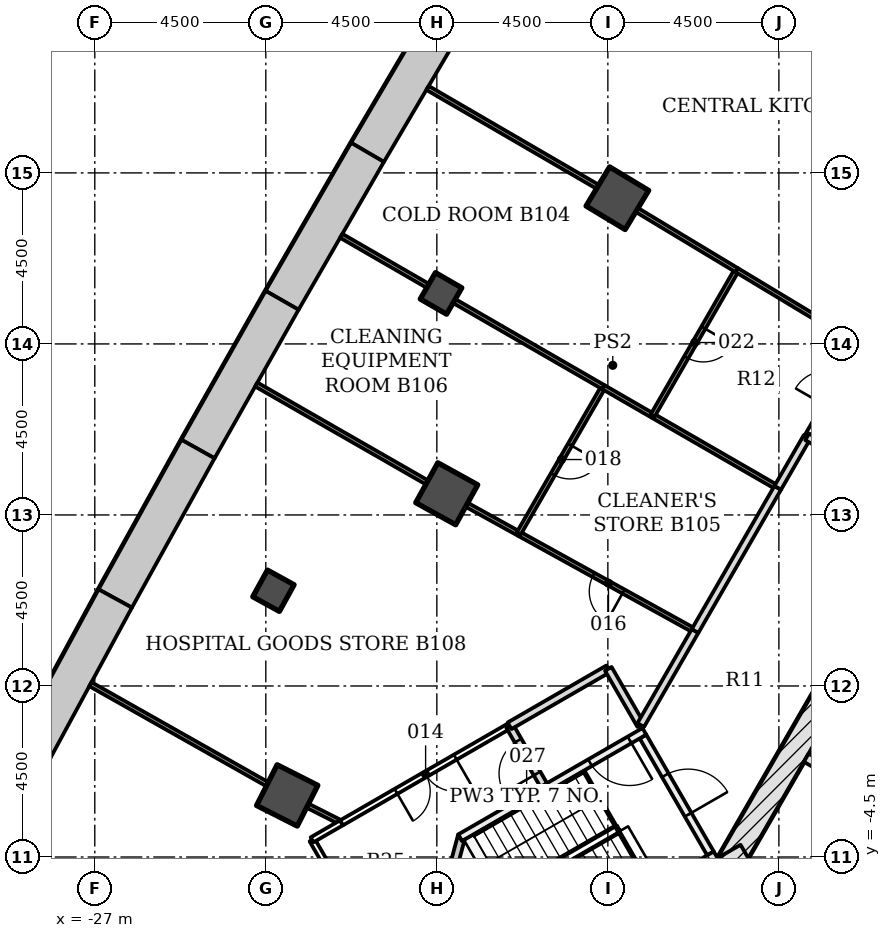
"""IFC4 building model, lengths in metres.
Left out: names, types, materials, properties, quantities, classifications, styles, units other than length and angle.
Written with IfcOpenShell. Run it as: python <this file> out.ifc"""

import sys

from ifc_helpers import new_model, si_unit, direction, frame, frame_2d, origin, origin_2d, place, context, subcontext, project, spatial, polyline, rectangle, outline, extrude, element, fill, save


model = new_model("IFC4")
c1 = context("Model", 3, precision=1e-05, world=origin(), true_north=direction((0.0, 1.0)))
c2 = subcontext(c1, "Body", "Model", "MODEL_VIEW")
j1 = project(units=[si_unit("LENGTHUNIT", "METRE"), si_unit("PLANEANGLEUNIT", "RADIAN")], contexts=[c1])
p1 = place(None, origin())
s1 = spatial("IfcSite", under=j1, at=p1, CompositionType="ELEMENT")
p2 = place(p1, origin())
s2 = spatial("IfcBuilding", under=s1, at=p2, CompositionType="ELEMENT")
p3 = place(p2, frame((0.0, 0.0, -4.5)))
s3 = spatial("IfcBuildingStorey", under=s2, at=p3, CompositionType="ELEMENT", Elevation=-4.5)
p4 = place(p3, origin())
e1 = element("IfcWall", 1, at=p4, inside=s3, PredefinedType="SOLIDWALL", context=c2, shape_type="SweptSolid", body=[
    extrude(outline(polyline([(-17.971, 18.17), (-20.256, 14.293), (-19.393, 13.789), (-17.112, 17.658), (-17.971, 18.17)])), origin(), (0.0, 0.0, 1.0), 4.25),
])
p5 = place(p3, origin())
e2 = element("IfcWall", 2, at=p5, inside=s3, PredefinedType="SOLIDWALL", context=c2, shape_type="SweptSolid", body=[
    extrude(outline(polyline([(-20.256, 14.293), (-22.506, 10.396), (-21.638, 9.9), (-19.393, 13.789), (-20.256, 14.293)])), origin(), (0.0, 0.0, 1.0), 4.25),
])
p6 = place(p3, origin())
e3 = element("IfcWall", 3, at=p6, inside=s3, PredefinedType="SOLIDWALL", context=c2, shape_type="SweptSolid", body=[
    extrude(outline(polyline([(-22.506, 10.396), (-24.721, 6.479), (-23.848, 5.99), (-21.638, 9.9), (-22.506, 10.396)])), origin(), (0.0, 0.0, 1.0), 4.25),
])
p7 = place(p3, origin())
e4 = element("IfcWall", 4, at=p7, inside=s3, PredefinedType="SOLIDWALL", context=c2, shape_type="SweptSolid", body=[
    extrude(outline(polyline([(-24.721, 6.479), (-26.901, 2.542), (-26.024, 2.062), (-23.848, 5.99), (-24.721, 6.479)])), origin(), (0.0, 0.0, 1.0), 4.25),
])
p8 = place(p3, origin())
e5 = element("IfcWall", 5, at=p8, inside=s3, PredefinedType="SOLIDWALL", context=c2, shape_type="SweptSolid", body=[
    extrude(outline(polyline([(-26.901, 2.542), (-29.045, -1.415), (-28.164, -1.887), (-26.024, 2.062), (-26.901, 2.542)])), origin(), (0.0, 0.0, 1.0), 4.25),
])
for number, where, z_axis, x_axis in (
    (6, (-13.25, 12.834, -0.3), (0.0, 0.0, 1.0), (-0.857, 0.516, 0.0)),
    (7, (-17.739, 5.058, -0.3), (0.0, 0.0, 1.0), (-0.875, 0.484, 0.0)),
    (8, (-21.937, -2.88, -0.3), (0.0, 0.0, 1.0), (-0.893, 0.451, 0.0)),
):
    element("IfcColumn", number, at=place(p3, frame(where, z_axis=z_axis, x_axis=x_axis)), inside=s3, PredefinedType="COLUMN", context=c2, shape_type="SweptSolid", body=[
        extrude(rectangle(XDim=1.2, YDim=1.2, at=origin_2d()), origin(), (0.0, 0.0, 1.0), 4.55),
    ])
for number, where, z_axis, x_axis in (
    (9, (-17.89, 10.329, -0.3), (0.0, 0.0, 1.0), (-0.866, 0.5, 0.0)),
    (10, (-22.3, 2.506, -0.3), (0.0, 0.0, 1.0), (-0.876, 0.482, 0.0)),
):
    element("IfcColumn", number, at=place(p3, frame(where, z_axis=z_axis, x_axis=x_axis)), inside=s3, PredefinedType="COLUMN", context=c2, shape_type="SweptSolid", body=[
        extrude(rectangle(XDim=0.8, YDim=0.8, at=origin_2d()), origin(), (0.0, 0.0, 1.0), 4.55),
    ])
p9 = place(p3, frame((-1.083, 11.281, -0.3), z_axis=(0.0, 0.0, 1.0), x_axis=(-0.500001446645, -0.866024568562, 0.0)))
e11 = element("IfcWall", 11, at=p9, inside=s3, PredefinedType="SHEAR", context=c2, shape_type="SweptSolid", body=[
    extrude(rectangle(XDim=18.458, YDim=0.7, at=frame_2d((9.229, 0.0))), origin(), (0.0, 0.0, 1.0), 4.55),
])
p10 = place(p9, frame((8.979, 0.0, 0.3)))
e12 = element("IfcOpeningElement", 12, at=p10, cuts=e11, PredefinedType="OPENING", context=c2, shape_type="SweptSolid", body=[
    extrude(rectangle(XDim=1.2, YDim=2.1, at=frame_2d((0.6, 1.05))), frame((0.0, 0.36, 0.0), z_axis=(0.0, -1.0, 0.0), x_axis=(1.0, 0.0, 0.0)), (0.0, 0.0, 1.0), 0.72),
])
p11 = place(p9, frame((11.029, 0.0, 0.3)))
e13 = element("IfcOpeningElement", 13, at=p11, cuts=e11, PredefinedType="OPENING", context=c2, shape_type="SweptSolid", body=[
    extrude(rectangle(XDim=1.2, YDim=2.1, at=frame_2d((0.6, 1.05))), frame((0.0, 0.36, 0.0), z_axis=(0.0, -1.0, 0.0), x_axis=(1.0, 0.0, 0.0)), (0.0, 0.0, 1.0), 0.72),
])
p12 = place(p3, frame((-10.311, -4.353, -0.3), z_axis=(0.0, 0.0, 1.0), x_axis=(0.500042739161, -0.866000726912, 0.0)))
e14 = element("IfcWall", 14, at=p12, inside=s3, PredefinedType="SHEAR", context=c2, shape_type="SweptSolid", body=[
    extrude(rectangle(XDim=2.771, YDim=0.7, at=frame_2d((1.386, 0.0))), origin(), (0.0, 0.0, 1.0), 4.55),
])
p13 = place(p3, frame((-8.281, -1.887, 0.0), z_axis=(0.0, 0.0, 1.0), x_axis=(0.866032775405, -0.499987231761, 0.0)))
e15 = element("IfcWall", 15, at=p13, inside=s3, PredefinedType="PARTITIONING", context=c2, shape_type="SweptSolid", body=[
    extrude(rectangle(XDim=2.9, YDim=0.25, at=frame_2d((1.45, 0.0))), origin(), (0.0, 0.0, 1.0), 4.25),
])
p14 = place(p3, frame((-12.576, -1.331, -0.3), z_axis=(0.0, 0.0, 1.0), x_axis=(0.499970499736, -0.8660424351, 0.0)))
e16 = element("IfcWall", 16, at=p14, inside=s3, PredefinedType="SHEAR", context=c2, shape_type="SweptSolid", body=[
    extrude(rectangle(XDim=3.55, YDim=0.2, at=frame_2d((1.775, 0.0))), origin(), (0.0, 0.0, 1.0), 4.55),
])
p15 = place(p14, frame((1.175, 0.0, 0.3)))
e17 = element("IfcOpeningElement", 17, at=p15, cuts=e16, PredefinedType="OPENING", context=c2, shape_type="SweptSolid", body=[
    extrude(rectangle(XDim=1.2, YDim=2.1, at=frame_2d((0.6, 1.05))), frame((0.0, 0.11, 0.0), z_axis=(0.0, -1.0, 0.0), x_axis=(1.0, 0.0, 0.0)), (0.0, 0.0, 1.0), 0.22),
])
p16 = place(p3, frame((-12.539, -1.194, -0.3), z_axis=(0.0, 0.0, 1.0), x_axis=(-0.866045472092, -0.499965239061, 0.0)))
e18 = element("IfcWall", 18, at=p16, inside=s3, PredefinedType="SHEAR", context=c2, shape_type="SweptSolid", body=[
    extrude(rectangle(XDim=5.6, YDim=0.2, at=frame_2d((2.8, 0.0))), origin(), (0.0, 0.0, 1.0), 4.55),
])
p17 = place(p16, frame((0.45, 0.0, 0.3)))
e19 = element("IfcOpeningElement", 19, at=p17, cuts=e18, PredefinedType="OPENING", context=c2, shape_type="SweptSolid", body=[
    extrude(rectangle(XDim=1.2, YDim=2.1, at=frame_2d((0.6, 1.05))), frame((0.0, 0.11, 0.0), z_axis=(0.0, -1.0, 0.0), x_axis=(1.0, 0.0, 0.0)), (0.0, 0.0, 1.0), 0.22),
])
p18 = place(p3, frame((-10.43, -4.847, -0.3), z_axis=(0.0, 0.0, 1.0), x_axis=(-0.866018442252, -0.500012057535, 0.0)))
e20 = element("IfcWall", 20, at=p18, inside=s3, PredefinedType="SHEAR", context=c2, shape_type="SweptSolid", body=[
    extrude(rectangle(XDim=7.2, YDim=1.136, at=frame_2d((3.6, 0.0))), origin(), (0.0, 0.0, 1.0), 4.55),
])
p19 = place(p3, frame((0.0, 0.0, -0.3)))
e21 = element("IfcWall", 21, at=p19, inside=s3, PredefinedType="SHEAR", context=c2, shape_type="SweptSolid", body=[
    extrude(outline(polyline([(-17.439, -3.907), (-18.025, -6.093), (-16.95, -7.955), (-16.777, -7.855), (-17.81, -6.065), (-17.267, -4.039), (-17.339, -4.081), (-17.339, -4.081), (-17.339, -4.081), (-17.339, -4.081), (-17.339, -4.081), (-17.339, -4.081), (-17.339, -4.081), (-17.339, -4.081), (-17.339, -4.081), (-17.339, -4.081), (-17.339, -4.081), (-17.339, -4.081), (-17.339, -4.081), (-17.339, -4.081), (-17.339, -4.081), (-17.339, -4.081), (-17.339, -4.081), (-17.439, -3.907)])), origin(), (0.0, 0.0, 1.0), 4.55),
])
p20 = place(p3, frame((-17.941, -9.838, 0.0), z_axis=(0.0, 0.0, 1.0), x_axis=(-0.500048140185, 0.865997608252, 0.0)))
e22 = element("IfcWall", 22, at=p20, inside=s3, PredefinedType="PARTITIONING", context=c2, shape_type="SweptSolid", body=[
    extrude(rectangle(XDim=6.683, YDim=0.15, at=frame_2d((3.342, 0.0))), origin(), (0.0, 0.0, 1.0), 3.638),
])
p21 = place(p20, frame((2.45, 0.0, 0.0)))
e23 = element("IfcOpeningElement", 23, at=p21, cuts=e22, PredefinedType="OPENING", context=c2, shape_type="SweptSolid", body=[
    extrude(rectangle(XDim=1.8, YDim=2.1, at=frame_2d((0.9, 1.05))), frame((0.0, 0.085, 0.0), z_axis=(0.0, -1.0, 0.0), x_axis=(1.0, 0.0, 0.0)), (0.0, 0.0, 1.0), 0.17),
])
p22 = place(p3, frame((-21.283, -4.048, 0.0), z_axis=(0.0, 0.0, 1.0), x_axis=(0.865804825377, 0.500381858538, 0.0)))
e24 = element("IfcWall", 24, at=p22, inside=s3, PredefinedType="PARTITIONING", context=c2, shape_type="SweptSolid", body=[
    extrude(rectangle(XDim=0.897, YDim=0.15, at=frame_2d((0.449, 0.0))), origin(), (0.0, 0.0, 1.0), 3.638),
])
p23 = place(p3, frame((-22.461, -2.584, 0.0), z_axis=(0.0, 0.0, 1.0), x_axis=(-0.87056283872, 0.492057256668, 0.0)))
e25 = element("IfcWall", 25, at=p23, inside=s3, PredefinedType="PARTITIONING", context=c2, shape_type="SweptSolid", body=[
    extrude(rectangle(XDim=5.347, YDim=0.12, at=frame_2d((2.674, 0.0))), origin(), (0.0, 0.0, 1.0), 3.633),
])
p24 = place(p3, frame((-20.509, -3.601, 0.0), z_axis=(0.0, 0.0, 1.0), x_axis=(-0.892316605155, 0.451410097544, 0.0)))
e26 = element("IfcWall", 26, at=p24, inside=s3, PredefinedType="PARTITIONING", context=c2, shape_type="SweptSolid", body=[
    extrude(rectangle(XDim=1.0, YDim=0.12, at=frame_2d((0.5, 0.0))), origin(), (0.0, 0.0, 1.0), 3.638),
])
p25 = place(p3, frame((-16.087, -1.049, 0.0), z_axis=(0.0, 0.0, 1.0), x_axis=(-0.866071706002, -0.49991979363, 0.0)))
e27 = element("IfcWall", 27, at=p25, inside=s3, PredefinedType="PARTITIONING", context=c2, shape_type="SweptSolid", body=[
    extrude(rectangle(XDim=5.105, YDim=0.15, at=frame_2d((2.552, 0.0))), origin(), (0.0, 0.0, 1.0), 3.638),
])
p26 = place(p25, frame((1.65, 0.0, 0.0)))
e28 = element("IfcOpeningElement", 28, at=p26, cuts=e27, PredefinedType="OPENING", context=c2, shape_type="SweptSolid", body=[
    extrude(rectangle(XDim=1.8, YDim=2.1, at=frame_2d((0.9, 1.05))), frame((0.0, 0.085, 0.0), z_axis=(0.0, -1.0, 0.0), x_axis=(1.0, 0.0, 0.0)), (0.0, 0.0, 1.0), 0.17),
])
p27 = place(p3, frame((-15.188, -2.607, 0.0), z_axis=(0.0, 0.0, 1.0), x_axis=(-0.500024172624, 0.866011447264, 0.0)))
e29 = element("IfcWall", 29, at=p27, inside=s3, PredefinedType="PARTITIONING", context=c2, shape_type="SweptSolid", body=[
    extrude(rectangle(XDim=1.798, YDim=0.2, at=frame_2d((0.899, 0.0))), origin(), (0.0, 0.0, 1.0), 3.638),
])
p28 = place(p27, frame((0.35, 0.0, 0.0)))
e30 = element("IfcOpeningElement", 30, at=p28, cuts=e29, PredefinedType="OPENING", context=c2, shape_type="SweptSolid", body=[
    extrude(rectangle(XDim=1.0, YDim=2.1, at=frame_2d((0.5, 1.05))), frame((0.0, 0.11, 0.0), z_axis=(0.0, -1.0, 0.0), x_axis=(1.0, 0.0, 0.0)), (0.0, 0.0, 1.0), 0.22),
])
p29 = place(p3, frame((-16.087, -1.048, 0.0), z_axis=(0.0, 0.0, 1.0), x_axis=(0.865988915629, 0.500063194015, 0.0)))
e31 = element("IfcWall", 31, at=p29, inside=s3, PredefinedType="PARTITIONING", context=c2, shape_type="SweptSolid", body=[
    extrude(rectangle(XDim=2.998, YDim=0.2, at=frame_2d((1.499, 0.0))), origin(), (0.0, 0.0, 1.0), 3.638),
])
p30 = place(p3, frame((-13.489, 0.451, 0.0), z_axis=(0.0, 0.0, 1.0), x_axis=(0.500044178772, -0.865999895656, 0.0)))
e32 = element("IfcWall", 32, at=p30, inside=s3, PredefinedType="PARTITIONING", context=c2, shape_type="SweptSolid", body=[
    extrude(rectangle(XDim=1.708, YDim=0.2, at=frame_2d((0.854, 0.0))), origin(), (0.0, 0.0, 1.0), 4.25),
])
p31 = place(p3, frame((-12.635, -1.028, 0.0), z_axis=(0.0, 0.0, 1.0), x_axis=(0.50005725472, 0.865992345233, 0.0)))
e33 = element("IfcWall", 33, at=p31, inside=s3, PredefinedType="PARTITIONING", context=c2, shape_type="SweptSolid", body=[
    extrude(rectangle(XDim=2.862, YDim=0.2, at=frame_2d((1.431, 0.0))), origin(), (0.0, 0.0, 1.0), 3.638),
])
p32 = place(p3, frame((-11.208, 1.446, 0.0), z_axis=(0.0, 0.0, 1.0), x_axis=(-0.875127041283, 0.483893233694, 0.0)))
e34 = element("IfcWall", 34, at=p32, inside=s3, PredefinedType="PARTITIONING", context=c2, shape_type="SweptSolid", body=[
    extrude(rectangle(XDim=5.299, YDim=0.12, at=frame_2d((2.649, 0.0))), origin(), (0.0, 0.0, 1.0), 3.638),
])
p33 = place(p32, frame((2.15, 0.0, 0.0)))
e35 = element("IfcOpeningElement", 35, at=p33, cuts=e34, PredefinedType="OPENING", context=c2, shape_type="SweptSolid", body=[
    extrude(rectangle(XDim=0.9, YDim=2.1, at=frame_2d((0.45, 1.05))), frame((0.0, 0.07, 0.0), z_axis=(0.0, -1.0, 0.0), x_axis=(1.0, 0.0, 0.0)), (0.0, 0.0, 1.0), 0.14),
])
p34 = place(p3, frame((-18.26, 5.356, 0.0), z_axis=(0.0, 0.0, 1.0), x_axis=(-0.867438170848, 0.497544992695, 0.0)))
e36 = element("IfcWall", 36, at=p34, inside=s3, PredefinedType="PARTITIONING", context=c2, shape_type="SweptSolid", body=[
    extrude(rectangle(XDim=5.177, YDim=0.12, at=frame_2d((2.589, 0.0))), origin(), (0.0, 0.0, 1.0), 3.633),
])
p35 = place(p3, frame((-15.848, 4.012, 0.0), z_axis=(0.0, 0.0, 1.0), x_axis=(-0.87521017078, 0.483742862442, 0.0)))
e37 = element("IfcWall", 37, at=p35, inside=s3, PredefinedType="PARTITIONING", context=c2, shape_type="SweptSolid", body=[
    extrude(rectangle(XDim=1.561, YDim=0.12, at=frame_2d((0.781, 0.0))), origin(), (0.0, 0.0, 1.0), 3.638),
])
p36 = place(p3, frame((-9.031, 5.213, 0.0), z_axis=(0.0, 0.0, 1.0), x_axis=(-0.500044734646, -0.865999574684, 0.0)))
e38 = element("IfcWall", 38, at=p36, inside=s3, PredefinedType="PARTITIONING", context=c2, shape_type="SweptSolid", body=[
    extrude(rectangle(XDim=4.35, YDim=0.2, at=frame_2d((2.175, 0.0))), origin(), (0.0, 0.0, 1.0), 3.638),
])
p37 = place(p3, frame((-8.256, 6.555, 0.0), z_axis=(0.0, 0.0, 1.0), x_axis=(-0.500177701192, -0.865922783642, 0.0)))
e39 = element("IfcWall", 39, at=p37, inside=s3, PredefinedType="PARTITIONING", context=c2, shape_type="SweptSolid", body=[
    extrude(rectangle(XDim=1.547, YDim=0.2, at=frame_2d((0.774, 0.0))), origin(), (0.0, 0.0, 1.0), 3.638),
])
p38 = place(p3, frame((-5.226, 4.806, 0.0), z_axis=(0.0, 0.0, 1.0), x_axis=(-0.865949687125, 0.500131122175, 0.0)))
e40 = element("IfcWall", 40, at=p38, inside=s3, PredefinedType="PARTITIONING", context=c2, shape_type="SweptSolid", body=[
    extrude(rectangle(XDim=3.499, YDim=0.2, at=frame_2d((1.75, 0.0))), origin(), (0.0, 0.0, 1.0), 4.25),
])
p39 = place(p38, frame((0.95, 0.0, 0.0)))
e41 = element("IfcOpeningElement", 41, at=p39, cuts=e40, PredefinedType="OPENING", context=c2, shape_type="SweptSolid", body=[
    extrude(rectangle(XDim=1.5, YDim=2.1, at=frame_2d((0.75, 1.05))), frame((0.0, 0.11, 0.0), z_axis=(0.0, -1.0, 0.0), x_axis=(1.0, 0.0, 0.0)), (0.0, 0.0, 1.0), 0.22),
])
p40 = place(p3, frame((-13.621, 7.863, 0.0), z_axis=(0.0, 0.0, 1.0), x_axis=(-0.500241930066, -0.865885680332, 0.0)))
e42 = element("IfcWall", 42, at=p40, inside=s3, PredefinedType="PARTITIONING", context=c2, shape_type="SweptSolid", body=[
    extrude(rectangle(XDim=4.448, YDim=0.12, at=frame_2d((2.224, 0.0))), origin(), (0.0, 0.0, 1.0), 3.638),
])
p41 = place(p40, frame((1.75, 0.0, 0.0)))
e43 = element("IfcOpeningElement", 43, at=p41, cuts=e42, PredefinedType="OPENING", context=c2, shape_type="SweptSolid", body=[
    extrude(rectangle(XDim=0.9, YDim=2.1, at=frame_2d((0.45, 1.05))), frame((0.0, 0.07, 0.0), z_axis=(0.0, -1.0, 0.0), x_axis=(1.0, 0.0, 0.0)), (0.0, 0.0, 1.0), 0.14),
])
p42 = place(p3, frame((-9.032, 5.215, 0.0), z_axis=(0.0, 0.0, 1.0), x_axis=(-0.866138487245, 0.49980408253, 0.0)))
e44 = element("IfcWall", 44, at=p42, inside=s3, PredefinedType="PARTITIONING", context=c2, shape_type="SweptSolid", body=[
    extrude(rectangle(XDim=3.797, YDim=0.12, at=frame_2d((1.899, 0.0))), origin(), (0.0, 0.0, 1.0), 3.638),
])
p43 = place(p3, frame((-12.324, 7.115, 0.0), z_axis=(0.0, 0.0, 1.0), x_axis=(-0.865912029007, 0.500196319479, 0.0)))
e45 = element("IfcWall", 45, at=p43, inside=s3, PredefinedType="PARTITIONING", context=c2, shape_type="SweptSolid", body=[
    extrude(rectangle(XDim=1.501, YDim=0.12, at=frame_2d((0.751, 0.0))), origin(), (0.0, 0.0, 1.0), 3.638),
])
p44 = place(p3, frame((-18.237, 10.528, 0.0), z_axis=(0.0, 0.0, 1.0), x_axis=(-0.865891873066, 0.5002312107, 0.0)))
e46 = element("IfcWall", 46, at=p44, inside=s3, PredefinedType="PARTITIONING", context=c2, shape_type="SweptSolid", body=[
    extrude(rectangle(XDim=2.631, YDim=0.12, at=frame_2d((1.315, 0.0))), origin(), (0.0, 0.0, 1.0), 4.25),
])
p45 = place(p3, frame((-13.617, 7.862, 0.0), z_axis=(0.0, 0.0, 1.0), x_axis=(-0.866103979259, 0.499863878583, 0.0)))
e47 = element("IfcWall", 47, at=p45, inside=s3, PredefinedType="PARTITIONING", context=c2, shape_type="SweptSolid", body=[
    extrude(rectangle(XDim=4.533, YDim=0.12, at=frame_2d((2.267, 0.0))), origin(), (0.0, 0.0, 1.0), 3.638),
])
p46 = place(p3, frame((-10.112, 10.942, 0.0), z_axis=(0.0, 0.0, 1.0), x_axis=(-0.500084296963, -0.86597672944, 0.0)))
e48 = element("IfcWall", 48, at=p46, inside=s3, PredefinedType="PARTITIONING", context=c2, shape_type="SweptSolid", body=[
    extrude(rectangle(XDim=4.419, YDim=0.12, at=frame_2d((2.209, 0.0))), origin(), (0.0, 0.0, 1.0), 3.638),
])
p47 = place(p46, frame((1.75, 0.0, 0.0)))
e49 = element("IfcOpeningElement", 49, at=p47, cuts=e48, PredefinedType="OPENING", context=c2, shape_type="SweptSolid", body=[
    extrude(rectangle(XDim=0.9, YDim=2.1, at=frame_2d((0.45, 1.05))), frame((0.0, 0.07, 0.0), z_axis=(0.0, -1.0, 0.0), x_axis=(1.0, 0.0, 0.0)), (0.0, 0.0, 1.0), 0.14),
])
p48 = place(p3, frame((-8.256, 6.558, 0.0), z_axis=(0.0, 0.0, 1.0), x_axis=(0.500081734942, 0.86597820895, 0.0)))
e50 = element("IfcWall", 50, at=p48, inside=s3, PredefinedType="PARTITIONING", context=c2, shape_type="SweptSolid", body=[
    extrude(rectangle(XDim=2.804, YDim=0.15, at=frame_2d((1.402, 0.0))), origin(), (0.0, 0.0, 1.0), 3.638),
])
p49 = place(p48, frame((0.95, 0.0, 0.0)))
e51 = element("IfcOpeningElement", 51, at=p49, cuts=e50, PredefinedType="OPENING", context=c2, shape_type="SweptSolid", body=[
    extrude(rectangle(XDim=0.9, YDim=2.1, at=frame_2d((0.45, 1.05))), frame((0.0, 0.085, 0.0), z_axis=(0.0, -1.0, 0.0), x_axis=(1.0, 0.0, 0.0)), (0.0, 0.0, 1.0), 0.17),
])
p50 = place(p3, frame((-6.857, 8.983, 0.0), z_axis=(0.0, 0.0, 1.0), x_axis=(-0.856573791655, 0.516024553147, 0.0)))
e52 = element("IfcWall", 52, at=p50, inside=s3, PredefinedType="PARTITIONING", context=c2, shape_type="SweptSolid", body=[
    extrude(rectangle(XDim=3.802, YDim=0.12, at=frame_2d((1.901, 0.0))), origin(), (0.0, 0.0, 1.0), 3.638),
])
p51 = place(p3, frame((-13.769, 13.135, 0.0), z_axis=(0.0, 0.0, 1.0), x_axis=(-0.864615819332, 0.502433562734, 0.0)))
e53 = element("IfcWall", 53, at=p51, inside=s3, PredefinedType="PARTITIONING", context=c2, shape_type="SweptSolid", body=[
    extrude(rectangle(XDim=5.177, YDim=0.12, at=frame_2d((2.588, 0.0))), origin(), (0.0, 0.0, 1.0), 3.633),
])
p52 = place(p3, frame((-10.108, 10.941, 0.0), z_axis=(0.0, 0.0, 1.0), x_axis=(-0.856614023764, 0.515957764058, 0.0)))
e54 = element("IfcWall", 54, at=p52, inside=s3, PredefinedType="PARTITIONING", context=c2, shape_type="SweptSolid", body=[
    extrude(rectangle(XDim=3.068, YDim=0.12, at=frame_2d((1.534, 0.0))), origin(), (0.0, 0.0, 1.0), 3.638),
])
p53 = place(p15, origin())
e55 = element("IfcDoor", 55, at=p53, inside=s3, OperationType="SINGLE_SWING_RIGHT", PredefinedType="DOOR", context=c2, shape_type="SweptSolid", body=[
    extrude(rectangle(XDim=1.2, YDim=2.1, at=frame_2d((0.6, 1.05))), frame((0.0, 0.025, 0.0), z_axis=(0.0, -1.0, 0.0), x_axis=(1.0, 0.0, 0.0)), (0.0, 0.0, 1.0), 0.05),
])
fill(e17, e55)
p54 = place(p17, origin())
e56 = element("IfcDoor", 56, at=p54, inside=s3, OperationType="SINGLE_SWING_LEFT", PredefinedType="DOOR", context=c2, shape_type="SweptSolid", body=[
    extrude(rectangle(XDim=1.2, YDim=2.1, at=frame_2d((0.6, 1.05))), frame((0.0, 0.025, 0.0), z_axis=(0.0, -1.0, 0.0), x_axis=(1.0, 0.0, 0.0)), (0.0, 0.0, 1.0), 0.05),
])
fill(e19, e56)
p55 = place(p26, origin())
e57 = element("IfcDoor", 57, at=p55, inside=s3, OperationType="DOUBLE_DOOR_SINGLE_SWING", PredefinedType="DOOR", context=c2, shape_type="SweptSolid", body=[
    extrude(rectangle(XDim=1.8, YDim=2.1, at=frame_2d((0.9, 1.05))), frame((0.0, 0.025, 0.0), z_axis=(0.0, -1.0, 0.0), x_axis=(1.0, 0.0, 0.0)), (0.0, 0.0, 1.0), 0.05),
])
fill(e28, e57)
p56 = place(p33, origin())
e58 = element("IfcDoor", 58, at=p56, inside=s3, OperationType="SINGLE_SWING_RIGHT", PredefinedType="DOOR", context=c2, shape_type="SweptSolid", body=[
    extrude(rectangle(XDim=0.9, YDim=2.1, at=frame_2d((0.45, 1.05))), frame((0.0, 0.025, 0.0), z_axis=(0.0, -1.0, 0.0), x_axis=(1.0, 0.0, 0.0)), (0.0, 0.0, 1.0), 0.05),
])
fill(e35, e58)
p57 = place(p41, origin())
e59 = element("IfcDoor", 59, at=p57, inside=s3, OperationType="SINGLE_SWING_RIGHT", PredefinedType="DOOR", context=c2, shape_type="SweptSolid", body=[
    extrude(rectangle(XDim=0.9, YDim=2.1, at=frame_2d((0.45, 1.05))), frame((0.0, 0.025, 0.0), z_axis=(0.0, -1.0, 0.0), x_axis=(1.0, 0.0, 0.0)), (0.0, 0.0, 1.0), 0.05),
])
fill(e43, e59)
p58 = place(p47, origin())
e60 = element("IfcDoor", 60, at=p58, inside=s3, OperationType="SINGLE_SWING_RIGHT", PredefinedType="DOOR", context=c2, shape_type="SweptSolid", body=[
    extrude(rectangle(XDim=0.9, YDim=2.1, at=frame_2d((0.45, 1.05))), frame((0.0, 0.025, 0.0), z_axis=(0.0, -1.0, 0.0), x_axis=(1.0, 0.0, 0.0)), (0.0, 0.0, 1.0), 0.05),
])
fill(e49, e60)
p59 = place(p28, origin())
e61 = element("IfcDoor", 61, at=p59, inside=s3, OperationType="SINGLE_SWING_LEFT", PredefinedType="DOOR", context=c2, shape_type="SweptSolid", body=[
    extrude(rectangle(XDim=1.0, YDim=2.1, at=frame_2d((0.5, 1.05))), frame((0.0, 0.025, 0.0), z_axis=(0.0, -1.0, 0.0), x_axis=(1.0, 0.0, 0.0)), (0.0, 0.0, 1.0), 0.05),
])
fill(e30, e61)
save(model, sys.argv[1])
